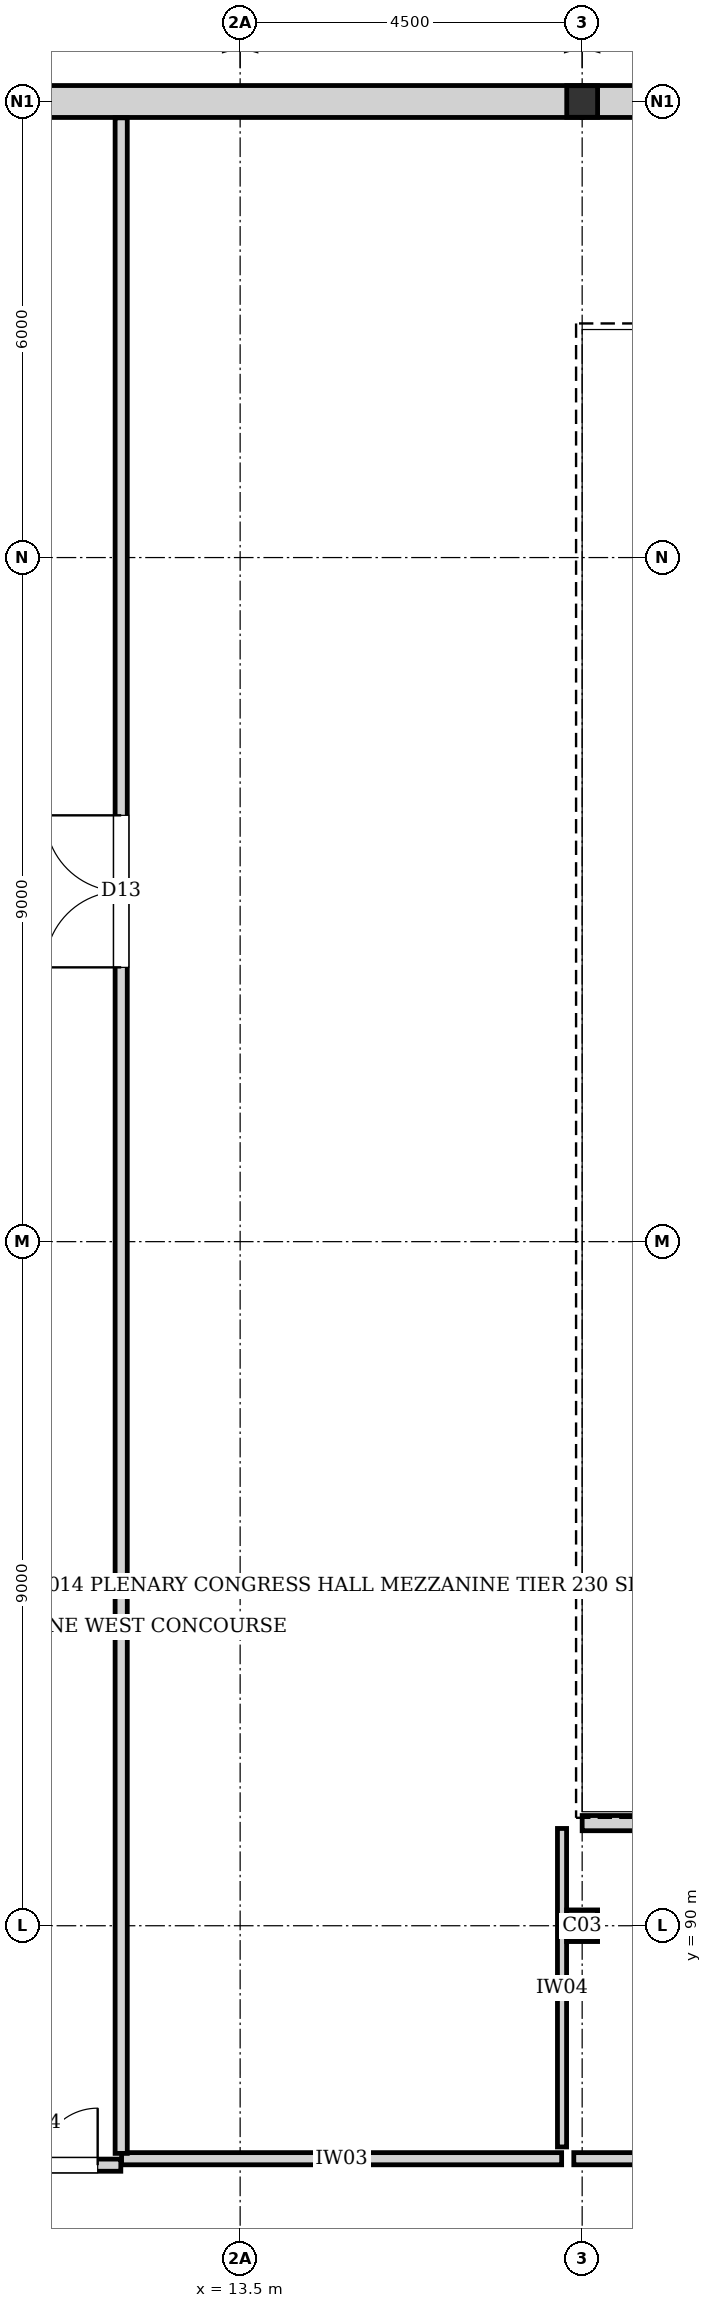
"""IFC4 building model, lengths in metres.
Left out: names, types, materials, properties, quantities, classifications, styles, units other than length and angle.
Written with IfcOpenShell. Run it as: python <this file> out.ifc"""

import sys

from ifc_helpers import new_model, si_unit, direction, frame, frame_2d, origin, origin_2d, place, context, subcontext, project, spatial, rectangle, i_section, extrude, element, fill, save


model = new_model("IFC4")
c1 = context("Model", 3, precision=1e-05, world=origin(), true_north=direction((0.0, 1.0)))
c2 = subcontext(c1, "Body", "Model", "MODEL_VIEW")
j1 = project(units=[si_unit("LENGTHUNIT", "METRE"), si_unit("PLANEANGLEUNIT", "RADIAN")], contexts=[c1])
p1 = place(None, origin())
s1 = spatial("IfcSite", under=j1, at=p1, CompositionType="ELEMENT")
p2 = place(p1, origin())
s2 = spatial("IfcBuilding", under=s1, at=p2, CompositionType="ELEMENT")
p3 = place(p2, frame((0.0, 0.0, 4.32)))
s3 = spatial("IfcBuildingStorey", under=s2, at=p3, CompositionType="ELEMENT", Elevation=4.32)
for number, where, z_axis, x_axis in (
    (1, (18.0, 90.0, 0.0), (0.0, 0.0, 1.0), (1.0, 0.0, 0.0)),
    (2, (18.0, 114.0, 0.0), (0.0, 0.0, 1.0), (1.0, 0.0, 0.0)),
):
    element("IfcColumn", number, at=place(p3, frame(where, z_axis=z_axis, x_axis=x_axis)), inside=s3, PredefinedType="COLUMN", context=c2, shape_type="SweptSolid", body=[
        extrude(i_section(OverallWidth=0.406, OverallDepth=0.416, WebThickness=0.022, FlangeThickness=0.038, at=origin_2d()), origin(), (0.0, 0.0, 1.0), 3.84),
    ])
p4 = place(p3, frame((9.0, 114.0, 0.0), z_axis=(0.0, 0.0, 1.0), x_axis=(1.0, 0.0, 0.0)))
e3 = element("IfcWall", 3, at=p4, inside=s3, PredefinedType="SOLIDWALL", context=c2, shape_type="SweptSolid", body=[
    extrude(rectangle(XDim=9.0, YDim=0.42, at=frame_2d((4.5, 0.0))), origin(), (0.0, 0.0, 1.0), 3.35),
])
p5 = place(p3, frame((18.0, 114.0, 0.0), z_axis=(0.0, 0.0, 1.0), x_axis=(1.0, 0.0, 0.0)))
e4 = element("IfcWall", 4, at=p5, inside=s3, PredefinedType="SOLIDWALL", context=c2, shape_type="SweptSolid", body=[
    extrude(rectangle(XDim=9.0, YDim=0.42, at=frame_2d((4.5, 0.0))), origin(), (0.0, 0.0, 1.0), 3.28),
])
p6 = place(p3, frame((11.94, 86.935, 0.0), z_axis=(0.0, 0.0, 1.0), x_axis=(1.0, 0.0, 0.0)))
e5 = element("IfcWall", 5, at=p6, inside=s3, PredefinedType="PARTITIONING", context=c2, shape_type="SweptSolid", body=[
    extrude(rectangle(XDim=5.79, YDim=0.16, at=frame_2d((2.895, 0.0))), origin(), (0.0, 0.0, 1.0), 3.6),
])
p7 = place(p3, frame((17.735, 87.09, 0.0), z_axis=(0.0, 0.0, 1.0), x_axis=(0.0, 1.0, 0.0)))
e6 = element("IfcWall", 6, at=p7, inside=s3, PredefinedType="PARTITIONING", context=c2, shape_type="SweptSolid", body=[
    extrude(rectangle(XDim=4.19, YDim=0.12, at=frame_2d((2.095, 0.0))), origin(), (0.0, 0.0, 1.0), 3.6),
])
p8 = place(p3, frame((9.155, 86.85, 0.0), z_axis=(0.0, 0.0, 1.0), x_axis=(1.0, 0.0, 0.0)))
e7 = element("IfcWall", 7, at=p8, inside=s3, PredefinedType="PARTITIONING", context=c2, shape_type="SweptSolid", body=[
    extrude(rectangle(XDim=2.775, YDim=0.16, at=frame_2d((1.387, 0.0))), origin(), (0.0, 0.0, 1.0), 3.6),
])
p9 = place(p8, frame((0.97, 0.0, 0.0)))
e8 = element("IfcOpeningElement", 8, at=p9, cuts=e7, PredefinedType="OPENING", context=c2, shape_type="SweptSolid", body=[
    extrude(rectangle(XDim=1.5, YDim=2.1, at=frame_2d((0.75, 1.05))), frame((0.0, 0.09, 0.0), z_axis=(0.0, -1.0, 0.0), x_axis=(1.0, 0.0, 0.0)), (0.0, 0.0, 1.0), 0.18),
])
p10 = place(p3, frame((17.89, 86.935, 0.0), z_axis=(0.0, 0.0, 1.0), x_axis=(1.0, 0.0, 0.0)))
e9 = element("IfcWall", 9, at=p10, inside=s3, PredefinedType="PARTITIONING", context=c2, shape_type="SweptSolid", body=[
    extrude(rectangle(XDim=13.39, YDim=0.16, at=frame_2d((6.695, 0.0))), origin(), (0.0, 0.0, 1.0), 3.6),
])
p11 = place(p10, frame((4.088, 0.0, 0.0)))
e10 = element("IfcOpeningElement", 10, at=p11, cuts=e9, PredefinedType="OPENING", context=c2, shape_type="SweptSolid", body=[
    extrude(rectangle(XDim=2.0, YDim=2.35, at=frame_2d((1.0, 1.175))), frame((0.0, 0.09, 0.0), z_axis=(0.0, -1.0, 0.0), x_axis=(1.0, 0.0, 0.0)), (0.0, 0.0, 1.0), 0.18),
])
p12 = place(p3, frame((11.935, 87.005, 0.0), z_axis=(0.0, 0.0, 1.0), x_axis=(0.0, 1.0, 0.0)))
e11 = element("IfcWall", 11, at=p12, inside=s3, PredefinedType="PARTITIONING", context=c2, shape_type="SweptSolid", body=[
    extrude(rectangle(XDim=26.78, YDim=0.16, at=frame_2d((13.39, 0.0))), origin(), (0.0, 0.0, 1.0), 3.6),
])
p13 = place(p12, frame((15.604, 0.0, 0.0)))
e12 = element("IfcOpeningElement", 12, at=p13, cuts=e11, PredefinedType="OPENING", context=c2, shape_type="SweptSolid", body=[
    extrude(rectangle(XDim=2.0, YDim=2.35, at=frame_2d((1.0, 1.175))), frame((0.0, 0.09, 0.0), z_axis=(0.0, -1.0, 0.0), x_axis=(1.0, 0.0, 0.0)), (0.0, 0.0, 1.0), 0.18),
])
p14 = place(p3, frame((18.0, 91.35, 0.0), z_axis=(0.0, 0.0, 1.0), x_axis=(1.0, 0.0, 0.0)))
e13 = element("IfcWall", 13, at=p14, inside=s3, PredefinedType="PARTITIONING", context=c2, shape_type="SweptSolid", body=[
    extrude(rectangle(XDim=27.0, YDim=0.2, at=frame_2d((13.5, 0.0))), origin(), (0.0, 0.0, 1.0), 3.6),
])
p15 = place(p9, origin())
e14 = element("IfcDoor", 14, at=p15, inside=s3, OperationType="DOUBLE_DOOR_SINGLE_SWING", PredefinedType="DOOR", context=c2, shape_type="SweptSolid", body=[
    extrude(rectangle(XDim=1.5, YDim=2.1, at=frame_2d((0.75, 1.05))), frame((0.0, 0.025, 0.0), z_axis=(0.0, -1.0, 0.0), x_axis=(1.0, 0.0, 0.0)), (0.0, 0.0, 1.0), 0.05),
])
fill(e8, e14)
p16 = place(p13, origin())
e15 = element("IfcDoor", 15, at=p16, inside=s3, OperationType="DOUBLE_DOOR_SINGLE_SWING", PredefinedType="DOOR", context=c2, shape_type="SweptSolid", body=[
    extrude(rectangle(XDim=2.0, YDim=2.35, at=frame_2d((1.0, 1.175))), frame((0.0, 0.025, 0.0), z_axis=(0.0, -1.0, 0.0), x_axis=(1.0, 0.0, 0.0)), (0.0, 0.0, 1.0), 0.05),
])
fill(e12, e15)
save(model, sys.argv[1])
